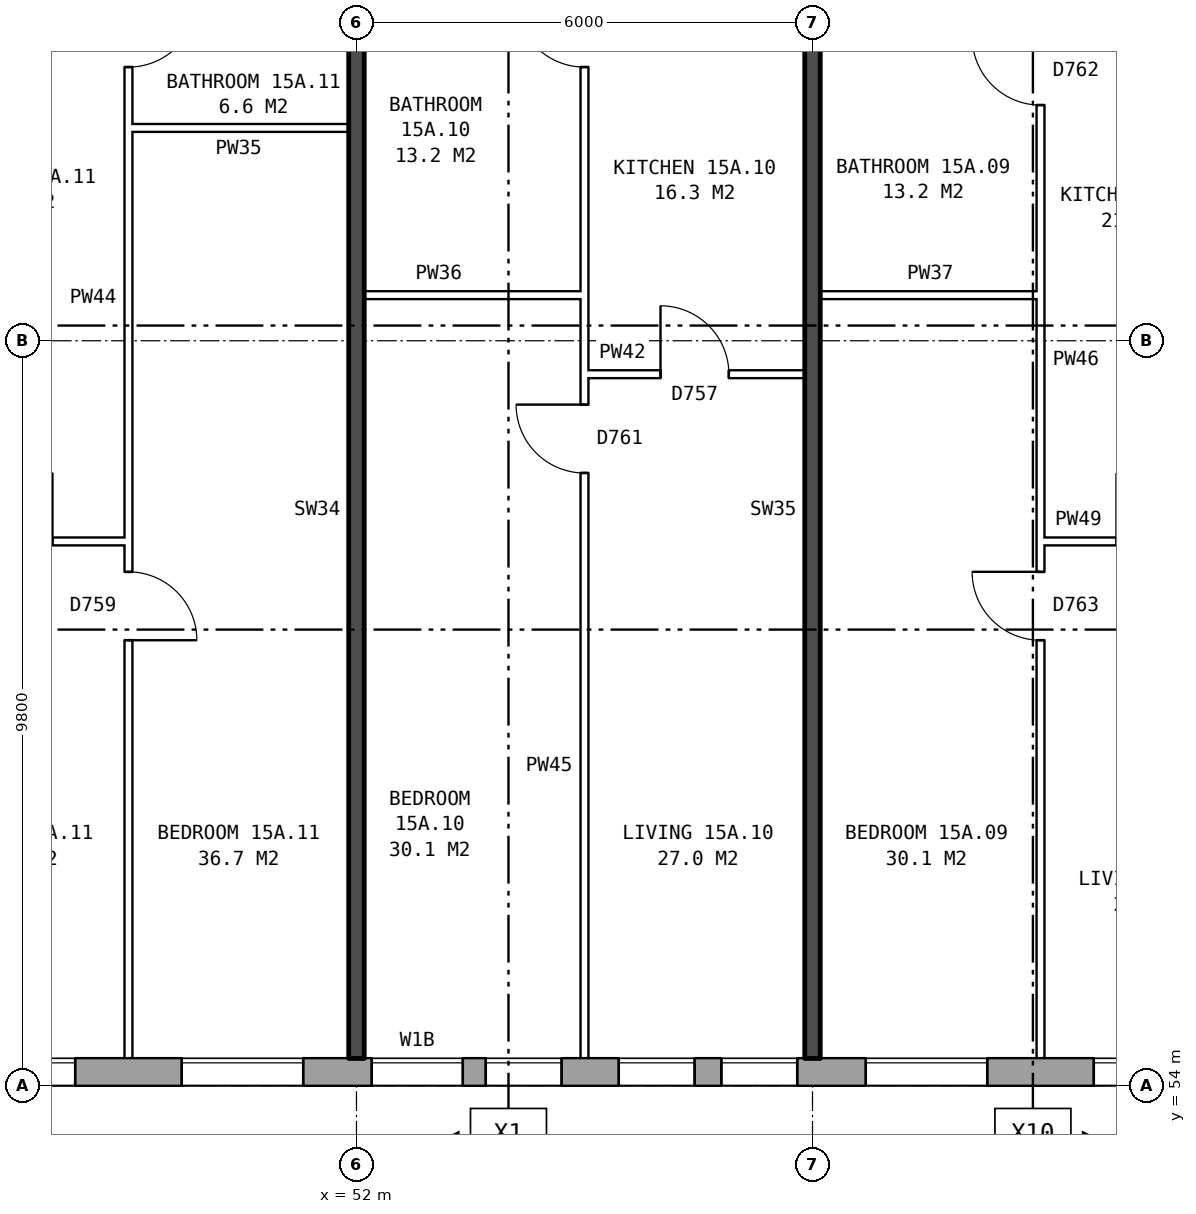
"""IFC4 building model, lengths in metres.
Left out: names, types, materials, properties, quantities, classifications, styles, units other than length and angle.
Written with IfcOpenShell. Run it as: python <this file> out.ifc"""

import sys

from ifc_helpers import new_model, si_unit, direction, frame, frame_2d, origin, place, context, subcontext, project, spatial, rectangle, extrude, element, fill, save


model = new_model("IFC4")
c1 = context("Model", 3, precision=1e-05, world=origin(), true_north=direction((0.0, 1.0)))
c2 = subcontext(c1, "Body", "Model", "MODEL_VIEW")
j1 = project(units=[si_unit("LENGTHUNIT", "METRE"), si_unit("PLANEANGLEUNIT", "RADIAN")], contexts=[c1])
p1 = place(None, origin())
s1 = spatial("IfcSite", under=j1, at=p1, CompositionType="ELEMENT")
p2 = place(p1, origin())
s2 = spatial("IfcBuilding", under=s1, at=p2, CompositionType="ELEMENT")
p3 = place(p2, frame((0.0, 0.0, 56.7)))
s3 = spatial("IfcBuildingStorey", under=s2, at=p3, CompositionType="ELEMENT", Elevation=56.7)
p4 = place(p3, frame((24.575, 54.18, 0.0), z_axis=(0.0, 0.0, 1.0), x_axis=(1.0, 0.0, 0.0)))
e1 = element("IfcWall", 1, at=p4, inside=s3, PredefinedType="STANDARD", context=c2, shape_type="SweptSolid", body=[
    extrude(rectangle(XDim=48.351, YDim=0.36, at=frame_2d((24.175, 0.0))), origin(), (0.0, 0.0, 1.0), 2.85),
])
p5 = place(p4, frame((1.125, 0.0, 0.8)))
e2 = element("IfcOpeningElement", 2, at=p5, cuts=e1, PredefinedType="OPENING", context=c2, shape_type="SweptSolid", body=[
    extrude(rectangle(XDim=1.6, YDim=1.8, at=frame_2d((0.8, 0.9))), frame((0.0, 0.19, 0.0), z_axis=(0.0, -1.0, 0.0), x_axis=(1.0, 0.0, 0.0)), (0.0, 0.0, 1.0), 0.38),
])
p6 = place(p4, frame((4.125, 0.0, 0.8)))
e3 = element("IfcOpeningElement", 3, at=p6, cuts=e1, PredefinedType="OPENING", context=c2, shape_type="SweptSolid", body=[
    extrude(rectangle(XDim=1.6, YDim=1.8, at=frame_2d((0.8, 0.9))), frame((0.0, 0.19, 0.0), z_axis=(0.0, -1.0, 0.0), x_axis=(1.0, 0.0, 0.0)), (0.0, 0.0, 1.0), 0.38),
])
p7 = place(p4, frame((7.125, 0.0, 0.8)))
e4 = element("IfcOpeningElement", 4, at=p7, cuts=e1, PredefinedType="OPENING", context=c2, shape_type="SweptSolid", body=[
    extrude(rectangle(XDim=1.6, YDim=1.8, at=frame_2d((0.8, 0.9))), frame((0.0, 0.19, 0.0), z_axis=(0.0, -1.0, 0.0), x_axis=(1.0, 0.0, 0.0)), (0.0, 0.0, 1.0), 0.38),
])
p8 = place(p4, frame((10.125, 0.0, 0.8)))
e5 = element("IfcOpeningElement", 5, at=p8, cuts=e1, PredefinedType="OPENING", context=c2, shape_type="SweptSolid", body=[
    extrude(rectangle(XDim=1.6, YDim=1.8, at=frame_2d((0.8, 0.9))), frame((0.0, 0.19, 0.0), z_axis=(0.0, -1.0, 0.0), x_axis=(1.0, 0.0, 0.0)), (0.0, 0.0, 1.0), 0.38),
])
p9 = place(p4, frame((13.125, 0.0, 0.8)))
e6 = element("IfcOpeningElement", 6, at=p9, cuts=e1, PredefinedType="OPENING", context=c2, shape_type="SweptSolid", body=[
    extrude(rectangle(XDim=1.6, YDim=1.8, at=frame_2d((0.8, 0.9))), frame((0.0, 0.19, 0.0), z_axis=(0.0, -1.0, 0.0), x_axis=(1.0, 0.0, 0.0)), (0.0, 0.0, 1.0), 0.38),
])
p10 = place(p4, frame((15.625, 0.0, 1.0)))
e7 = element("IfcOpeningElement", 7, at=p10, cuts=e1, PredefinedType="OPENING", context=c2, shape_type="SweptSolid", body=[
    extrude(rectangle(XDim=0.8, YDim=1.5, at=frame_2d((0.4, 0.75))), frame((0.0, 0.19, 0.0), z_axis=(0.0, -1.0, 0.0), x_axis=(1.0, 0.0, 0.0)), (0.0, 0.0, 1.0), 0.38),
])
p11 = place(p4, frame((16.725, 0.0, 1.6)))
e8 = element("IfcOpeningElement", 8, at=p11, cuts=e1, PredefinedType="OPENING", context=c2, shape_type="SweptSolid", body=[
    extrude(rectangle(XDim=0.6, YDim=0.9, at=frame_2d((0.3, 0.45))), frame((0.0, 0.19, 0.0), z_axis=(0.0, -1.0, 0.0), x_axis=(1.0, 0.0, 0.0)), (0.0, 0.0, 1.0), 0.38),
])
p12 = place(p4, frame((22.125, 0.0, 0.8)))
e9 = element("IfcOpeningElement", 9, at=p12, cuts=e1, PredefinedType="OPENING", context=c2, shape_type="SweptSolid", body=[
    extrude(rectangle(XDim=1.6, YDim=1.8, at=frame_2d((0.8, 0.9))), frame((0.0, 0.19, 0.0), z_axis=(0.0, -1.0, 0.0), x_axis=(1.0, 0.0, 0.0)), (0.0, 0.0, 1.0), 0.38),
])
p13 = place(p4, frame((25.125, 0.0, 0.8)))
e10 = element("IfcOpeningElement", 10, at=p13, cuts=e1, PredefinedType="OPENING", context=c2, shape_type="SweptSolid", body=[
    extrude(rectangle(XDim=1.6, YDim=1.8, at=frame_2d((0.8, 0.9))), frame((0.0, 0.19, 0.0), z_axis=(0.0, -1.0, 0.0), x_axis=(1.0, 0.0, 0.0)), (0.0, 0.0, 1.0), 0.38),
])
p14 = place(p4, frame((27.625, 0.0, 0.35)))
e11 = element("IfcOpeningElement", 11, at=p14, cuts=e1, PredefinedType="OPENING", context=c2, shape_type="SweptSolid", body=[
    extrude(rectangle(XDim=1.2, YDim=1.8, at=frame_2d((0.6, 0.9))), frame((0.0, 0.19, 0.0), z_axis=(0.0, -1.0, 0.0), x_axis=(1.0, 0.0, 0.0)), (0.0, 0.0, 1.0), 0.38),
])
p15 = place(p4, frame((30.875, 0.0, 1.7)))
e12 = element("IfcOpeningElement", 12, at=p15, cuts=e1, PredefinedType="OPENING", context=c2, shape_type="SweptSolid", body=[
    extrude(rectangle(XDim=1.0, YDim=0.9, at=frame_2d((0.5, 0.45))), frame((0.0, 0.19, 0.0), z_axis=(0.0, -1.0, 0.0), x_axis=(1.0, 0.0, 0.0)), (0.0, 0.0, 1.0), 0.38),
])
p16 = place(p4, frame((34.125, 0.0, 0.8)))
e13 = element("IfcOpeningElement", 13, at=p16, cuts=e1, PredefinedType="OPENING", context=c2, shape_type="SweptSolid", body=[
    extrude(rectangle(XDim=1.6, YDim=1.8, at=frame_2d((0.8, 0.9))), frame((0.0, 0.19, 0.0), z_axis=(0.0, -1.0, 0.0), x_axis=(1.0, 0.0, 0.0)), (0.0, 0.0, 1.0), 0.38),
])
p17 = place(p4, frame((37.125, 0.0, 0.8)))
e14 = element("IfcOpeningElement", 14, at=p17, cuts=e1, PredefinedType="OPENING", context=c2, shape_type="SweptSolid", body=[
    extrude(rectangle(XDim=1.6, YDim=1.8, at=frame_2d((0.8, 0.9))), frame((0.0, 0.19, 0.0), z_axis=(0.0, -1.0, 0.0), x_axis=(1.0, 0.0, 0.0)), (0.0, 0.0, 1.0), 0.38),
])
p18 = place(p4, frame((40.125, 0.0, 0.8)))
e15 = element("IfcOpeningElement", 15, at=p18, cuts=e1, PredefinedType="OPENING", context=c2, shape_type="SweptSolid", body=[
    extrude(rectangle(XDim=1.6, YDim=1.8, at=frame_2d((0.8, 0.9))), frame((0.0, 0.19, 0.0), z_axis=(0.0, -1.0, 0.0), x_axis=(1.0, 0.0, 0.0)), (0.0, 0.0, 1.0), 0.38),
])
p19 = place(p4, frame((43.125, 0.0, 0.8)))
e16 = element("IfcOpeningElement", 16, at=p19, cuts=e1, PredefinedType="OPENING", context=c2, shape_type="SweptSolid", body=[
    extrude(rectangle(XDim=1.6, YDim=1.8, at=frame_2d((0.8, 0.9))), frame((0.0, 0.19, 0.0), z_axis=(0.0, -1.0, 0.0), x_axis=(1.0, 0.0, 0.0)), (0.0, 0.0, 1.0), 0.38),
])
p20 = place(p4, frame((46.125, 0.0, 0.8)))
e17 = element("IfcOpeningElement", 17, at=p20, cuts=e1, PredefinedType="OPENING", context=c2, shape_type="SweptSolid", body=[
    extrude(rectangle(XDim=1.6, YDim=1.8, at=frame_2d((0.8, 0.9))), frame((0.0, 0.19, 0.0), z_axis=(0.0, -1.0, 0.0), x_axis=(1.0, 0.0, 0.0)), (0.0, 0.0, 1.0), 0.38),
])
p21 = place(p4, frame((18.875, 0.0, 0.8)))
e18 = element("IfcOpeningElement", 18, at=p21, cuts=e1, PredefinedType="OPENING", context=c2, shape_type="SweptSolid", body=[
    extrude(rectangle(XDim=1.0, YDim=0.9, at=frame_2d((0.5, 0.45))), frame((0.0, 0.19, 0.0), z_axis=(0.0, -1.0, 0.0), x_axis=(1.0, 0.0, 0.0)), (0.0, 0.0, 1.0), 0.38),
])
p22 = place(p4, frame((20.175, 0.0, 0.8)))
e19 = element("IfcOpeningElement", 19, at=p22, cuts=e1, PredefinedType="OPENING", context=c2, shape_type="SweptSolid", body=[
    extrude(rectangle(XDim=1.0, YDim=1.8, at=frame_2d((0.5, 0.9))), frame((0.0, 0.19, 0.0), z_axis=(0.0, -1.0, 0.0), x_axis=(1.0, 0.0, 0.0)), (0.0, 0.0, 1.0), 0.38),
])
p23 = place(p4, frame((29.125, 0.0, 0.35)))
e20 = element("IfcOpeningElement", 20, at=p23, cuts=e1, PredefinedType="OPENING", context=c2, shape_type="SweptSolid", body=[
    extrude(rectangle(XDim=1.0, YDim=0.9, at=frame_2d((0.5, 0.45))), frame((0.0, 0.19, 0.0), z_axis=(0.0, -1.0, 0.0), x_axis=(1.0, 0.0, 0.0)), (0.0, 0.0, 1.0), 0.38),
])
p24 = place(p4, frame((32.225, 0.0, 0.8)))
e21 = element("IfcOpeningElement", 21, at=p24, cuts=e1, PredefinedType="OPENING", context=c2, shape_type="SweptSolid", body=[
    extrude(rectangle(XDim=1.0, YDim=1.8, at=frame_2d((0.5, 0.9))), frame((0.0, 0.19, 0.0), z_axis=(0.0, -1.0, 0.0), x_axis=(1.0, 0.0, 0.0)), (0.0, 0.0, 1.0), 0.38),
])
p25 = place(p3, frame((46.1, 61.16, 0.0), z_axis=(0.0, 0.0, 1.0), x_axis=(1.0, 0.0, 0.0)))
e22 = element("IfcWall", 22, at=p25, inside=s3, PredefinedType="PARTITIONING", context=c2, shape_type="SweptSolid", body=[
    extrude(rectangle(XDim=2.9, YDim=0.1, at=frame_2d((1.45, 0.0))), origin(), (0.0, 0.0, 1.0), 2.85),
])
p26 = place(p25, frame((1.0, 0.0, 0.0)))
e23 = element("IfcOpeningElement", 23, at=p26, cuts=e22, PredefinedType="OPENING", context=c2, shape_type="SweptSolid", body=[
    extrude(rectangle(XDim=0.9, YDim=2.1, at=frame_2d((0.45, 1.05))), frame((0.0, 0.06, 0.0), z_axis=(0.0, -1.0, 0.0), x_axis=(1.0, 0.0, 0.0)), (0.0, 0.0, 1.0), 0.12),
])
p27 = place(p3, frame((61.0, 61.16, 0.0), z_axis=(0.0, 0.0, 1.0), x_axis=(1.0, 0.0, 0.0)))
e24 = element("IfcWall", 24, at=p27, inside=s3, PredefinedType="PARTITIONING", context=c2, shape_type="SweptSolid", body=[
    extrude(rectangle(XDim=2.9, YDim=0.1, at=frame_2d((1.45, 0.0))), origin(), (0.0, 0.0, 1.0), 2.85),
])
p28 = place(p27, frame((1.0, 0.0, 0.0)))
e25 = element("IfcOpeningElement", 25, at=p28, cuts=e24, PredefinedType="OPENING", context=c2, shape_type="SweptSolid", body=[
    extrude(rectangle(XDim=0.9, YDim=2.1, at=frame_2d((0.45, 1.05))), frame((0.0, 0.06, 0.0), z_axis=(0.0, -1.0, 0.0), x_axis=(1.0, 0.0, 0.0)), (0.0, 0.0, 1.0), 0.12),
])
p29 = place(p3, frame((55.0, 63.36, 0.0), z_axis=(0.0, 0.0, 1.0), x_axis=(1.0, 0.0, 0.0)))
e26 = element("IfcWall", 26, at=p29, inside=s3, PredefinedType="PARTITIONING", context=c2, shape_type="SweptSolid", body=[
    extrude(rectangle(XDim=2.9, YDim=0.1, at=frame_2d((1.45, 0.0))), origin(), (0.0, 0.0, 1.0), 2.85),
])
p30 = place(p29, frame((1.0, 0.0, 0.0)))
e27 = element("IfcOpeningElement", 27, at=p30, cuts=e26, PredefinedType="OPENING", context=c2, shape_type="SweptSolid", body=[
    extrude(rectangle(XDim=0.9, YDim=2.1, at=frame_2d((0.45, 1.05))), frame((0.0, 0.06, 0.0), z_axis=(0.0, -1.0, 0.0), x_axis=(1.0, 0.0, 0.0)), (0.0, 0.0, 1.0), 0.12),
])
for number, where, z_axis, x_axis in (
    (28, (52.1, 64.4, 0.0), (0.0, 0.0, 1.0), (1.0, 0.0, 0.0)),
    (29, (58.1, 64.4, 0.0), (0.0, 0.0, 1.0), (1.0, 0.0, 0.0)),
    (30, (49.0, 66.6, 0.0), (0.0, 0.0, 1.0), (1.0, 0.0, 0.0)),
):
    element("IfcWall", number, at=place(p3, frame(where, z_axis=z_axis, x_axis=x_axis)), inside=s3, PredefinedType="PARTITIONING", context=c2, shape_type="SweptSolid", body=[
        extrude(rectangle(XDim=2.9, YDim=0.1, at=frame_2d((1.45, 0.0))), origin(), (0.0, 0.0, 1.0), 2.85),
    ])
p31 = place(p3, frame((49.0, 54.36, 0.0), z_axis=(0.0, 0.0, 1.0), x_axis=(0.0, 1.0, 0.0)))
e31 = element("IfcWall", 31, at=p31, inside=s3, PredefinedType="PARTITIONING", context=c2, shape_type="SweptSolid", body=[
    extrude(rectangle(XDim=14.34, YDim=0.1, at=frame_2d((7.17, 0.0))), origin(), (0.0, 0.0, 1.0), 2.85),
])
p32 = place(p31, frame((5.5, 0.0, 0.0)))
e32 = element("IfcOpeningElement", 32, at=p32, cuts=e31, PredefinedType="OPENING", context=c2, shape_type="SweptSolid", body=[
    extrude(rectangle(XDim=0.9, YDim=2.1, at=frame_2d((0.45, 1.05))), frame((0.0, 0.06, 0.0), z_axis=(0.0, -1.0, 0.0), x_axis=(1.0, 0.0, 0.0)), (0.0, 0.0, 1.0), 0.12),
])
p33 = place(p31, frame((13.04, 0.0, 0.0)))
e33 = element("IfcOpeningElement", 33, at=p33, cuts=e31, PredefinedType="OPENING", context=c2, shape_type="SweptSolid", body=[
    extrude(rectangle(XDim=0.9, YDim=2.1, at=frame_2d((0.45, 1.05))), frame((0.0, 0.06, 0.0), z_axis=(0.0, -1.0, 0.0), x_axis=(1.0, 0.0, 0.0)), (0.0, 0.0, 1.0), 0.12),
])
p34 = place(p3, frame((52.0, 54.36, 0.0), z_axis=(0.0, 0.0, 1.0), x_axis=(0.0, 1.0, 0.0)))
e34 = element("IfcWall", 34, at=p34, inside=s3, PredefinedType="SOLIDWALL", context=c2, shape_type="SweptSolid", body=[
    extrude(rectangle(XDim=14.44, YDim=0.2, at=frame_2d((7.22, 0.0))), origin(), (0.0, 0.0, 1.0), 2.85),
])
p35 = place(p3, frame((55.0, 54.36, 0.0), z_axis=(0.0, 0.0, 1.0), x_axis=(0.0, 1.0, 0.0)))
e35 = element("IfcWall", 35, at=p35, inside=s3, PredefinedType="PARTITIONING", context=c2, shape_type="SweptSolid", body=[
    extrude(rectangle(XDim=14.34, YDim=0.1, at=frame_2d((7.17, 0.0))), origin(), (0.0, 0.0, 1.0), 2.85),
])
p36 = place(p35, frame((7.7, 0.0, 0.0)))
e36 = element("IfcOpeningElement", 36, at=p36, cuts=e35, PredefinedType="OPENING", context=c2, shape_type="SweptSolid", body=[
    extrude(rectangle(XDim=0.9, YDim=2.1, at=frame_2d((0.45, 1.05))), frame((0.0, 0.06, 0.0), z_axis=(0.0, -1.0, 0.0), x_axis=(1.0, 0.0, 0.0)), (0.0, 0.0, 1.0), 0.12),
])
p37 = place(p35, frame((13.04, 0.0, 0.0)))
e37 = element("IfcOpeningElement", 37, at=p37, cuts=e35, PredefinedType="OPENING", context=c2, shape_type="SweptSolid", body=[
    extrude(rectangle(XDim=0.9, YDim=2.1, at=frame_2d((0.45, 1.05))), frame((0.0, 0.06, 0.0), z_axis=(0.0, -1.0, 0.0), x_axis=(1.0, 0.0, 0.0)), (0.0, 0.0, 1.0), 0.12),
])
p38 = place(p3, frame((58.0, 54.36, 0.0), z_axis=(0.0, 0.0, 1.0), x_axis=(0.0, 1.0, 0.0)))
e38 = element("IfcWall", 38, at=p38, inside=s3, PredefinedType="SOLIDWALL", context=c2, shape_type="SweptSolid", body=[
    extrude(rectangle(XDim=14.44, YDim=0.2, at=frame_2d((7.22, 0.0))), origin(), (0.0, 0.0, 1.0), 2.85),
])
p39 = place(p3, frame((61.0, 54.36, 0.0), z_axis=(0.0, 0.0, 1.0), x_axis=(0.0, 1.0, 0.0)))
e39 = element("IfcWall", 39, at=p39, inside=s3, PredefinedType="PARTITIONING", context=c2, shape_type="SweptSolid", body=[
    extrude(rectangle(XDim=14.34, YDim=0.1, at=frame_2d((7.17, 0.0))), origin(), (0.0, 0.0, 1.0), 2.85),
])
p40 = place(p39, frame((5.5, 0.0, 0.0)))
e40 = element("IfcOpeningElement", 40, at=p40, cuts=e39, PredefinedType="OPENING", context=c2, shape_type="SweptSolid", body=[
    extrude(rectangle(XDim=0.9, YDim=2.1, at=frame_2d((0.45, 1.05))), frame((0.0, 0.06, 0.0), z_axis=(0.0, -1.0, 0.0), x_axis=(1.0, 0.0, 0.0)), (0.0, 0.0, 1.0), 0.12),
])
p41 = place(p39, frame((12.54, 0.0, 0.0)))
e41 = element("IfcOpeningElement", 41, at=p41, cuts=e39, PredefinedType="OPENING", context=c2, shape_type="SweptSolid", body=[
    extrude(rectangle(XDim=0.9, YDim=2.1, at=frame_2d((0.45, 1.05))), frame((0.0, 0.06, 0.0), z_axis=(0.0, -1.0, 0.0), x_axis=(1.0, 0.0, 0.0)), (0.0, 0.0, 1.0), 0.12),
])
p42 = place(p12, origin())
e42 = element("IfcWindow", 42, at=p42, inside=s3, PartitioningType="SINGLE_PANEL", PredefinedType="WINDOW", context=c2, shape_type="SweptSolid", body=[
    extrude(rectangle(XDim=1.6, YDim=1.8, at=frame_2d((0.8, 0.9))), frame((0.0, 0.15, 0.0), z_axis=(0.0, -1.0, 0.0), x_axis=(1.0, 0.0, 0.0)), (0.0, 0.0, 1.0), 0.06),
])
fill(e9, e42)
p43 = place(p13, origin())
e43 = element("IfcWindow", 43, at=p43, inside=s3, PartitioningType="SINGLE_PANEL", PredefinedType="WINDOW", context=c2, shape_type="SweptSolid", body=[
    extrude(rectangle(XDim=1.6, YDim=1.8, at=frame_2d((0.8, 0.9))), frame((0.0, 0.15, 0.0), z_axis=(0.0, -1.0, 0.0), x_axis=(1.0, 0.0, 0.0)), (0.0, 0.0, 1.0), 0.06),
])
fill(e10, e43)
p44 = place(p14, origin())
e44 = element("IfcWindow", 44, at=p44, inside=s3, PartitioningType="SINGLE_PANEL", PredefinedType="WINDOW", context=c2, shape_type="SweptSolid", body=[
    extrude(rectangle(XDim=1.2, YDim=1.8, at=frame_2d((0.6, 0.9))), frame((0.0, 0.15, 0.0), z_axis=(0.0, -1.0, 0.0), x_axis=(1.0, 0.0, 0.0)), (0.0, 0.0, 1.0), 0.06),
])
fill(e11, e44)
p45 = place(p15, origin())
e45 = element("IfcWindow", 45, at=p45, inside=s3, PartitioningType="SINGLE_PANEL", PredefinedType="WINDOW", context=c2, shape_type="SweptSolid", body=[
    extrude(rectangle(XDim=1.0, YDim=0.9, at=frame_2d((0.5, 0.45))), frame((0.0, 0.15, 0.0), z_axis=(0.0, -1.0, 0.0), x_axis=(1.0, 0.0, 0.0)), (0.0, 0.0, 1.0), 0.06),
])
fill(e12, e45)
p46 = place(p16, origin())
e46 = element("IfcWindow", 46, at=p46, inside=s3, PartitioningType="SINGLE_PANEL", PredefinedType="WINDOW", context=c2, shape_type="SweptSolid", body=[
    extrude(rectangle(XDim=1.6, YDim=1.8, at=frame_2d((0.8, 0.9))), frame((0.0, 0.15, 0.0), z_axis=(0.0, -1.0, 0.0), x_axis=(1.0, 0.0, 0.0)), (0.0, 0.0, 1.0), 0.06),
])
fill(e13, e46)
p47 = place(p17, origin())
e47 = element("IfcWindow", 47, at=p47, inside=s3, PartitioningType="SINGLE_PANEL", PredefinedType="WINDOW", context=c2, shape_type="SweptSolid", body=[
    extrude(rectangle(XDim=1.6, YDim=1.8, at=frame_2d((0.8, 0.9))), frame((0.0, 0.15, 0.0), z_axis=(0.0, -1.0, 0.0), x_axis=(1.0, 0.0, 0.0)), (0.0, 0.0, 1.0), 0.06),
])
fill(e14, e47)
p48 = place(p40, origin())
e48 = element("IfcDoor", 48, at=p48, inside=s3, OperationType="SINGLE_SWING_RIGHT", PredefinedType="DOOR", context=c2, shape_type="SweptSolid", body=[
    extrude(rectangle(XDim=0.9, YDim=2.1, at=frame_2d((0.45, 1.05))), frame((0.0, 0.025, 0.0), z_axis=(0.0, -1.0, 0.0), x_axis=(1.0, 0.0, 0.0)), (0.0, 0.0, 1.0), 0.05),
])
fill(e40, e48)
p49 = place(p41, origin())
e49 = element("IfcDoor", 49, at=p49, inside=s3, OperationType="SINGLE_SWING_RIGHT", PredefinedType="DOOR", context=c2, shape_type="SweptSolid", body=[
    extrude(rectangle(XDim=0.9, YDim=2.1, at=frame_2d((0.45, 1.05))), frame((0.0, 0.025, 0.0), z_axis=(0.0, -1.0, 0.0), x_axis=(1.0, 0.0, 0.0)), (0.0, 0.0, 1.0), 0.05),
])
fill(e41, e49)
p50 = place(p36, origin())
e50 = element("IfcDoor", 50, at=p50, inside=s3, OperationType="SINGLE_SWING_RIGHT", PredefinedType="DOOR", context=c2, shape_type="SweptSolid", body=[
    extrude(rectangle(XDim=0.9, YDim=2.1, at=frame_2d((0.45, 1.05))), frame((0.0, 0.025, 0.0), z_axis=(0.0, -1.0, 0.0), x_axis=(1.0, 0.0, 0.0)), (0.0, 0.0, 1.0), 0.05),
])
fill(e36, e50)
p51 = place(p30, origin())
e51 = element("IfcDoor", 51, at=p51, inside=s3, OperationType="SINGLE_SWING_LEFT", PredefinedType="DOOR", context=c2, shape_type="SweptSolid", body=[
    extrude(rectangle(XDim=0.9, YDim=2.1, at=frame_2d((0.45, 1.05))), frame((0.0, 0.025, 0.0), z_axis=(0.0, -1.0, 0.0), x_axis=(1.0, 0.0, 0.0)), (0.0, 0.0, 1.0), 0.05),
])
fill(e27, e51)
p52 = place(p37, origin())
e52 = element("IfcDoor", 52, at=p52, inside=s3, OperationType="SINGLE_SWING_RIGHT", PredefinedType="DOOR", context=c2, shape_type="SweptSolid", body=[
    extrude(rectangle(XDim=0.9, YDim=2.1, at=frame_2d((0.45, 1.05))), frame((0.0, 0.025, 0.0), z_axis=(0.0, -1.0, 0.0), x_axis=(1.0, 0.0, 0.0)), (0.0, 0.0, 1.0), 0.05),
])
fill(e37, e52)
p53 = place(p32, frame((0.9, 0.0, 0.0), z_axis=(0.0, 0.0, 1.0), x_axis=(-1.0, 0.0, 0.0)))
e53 = element("IfcDoor", 53, at=p53, inside=s3, OperationType="SINGLE_SWING_RIGHT", PredefinedType="DOOR", context=c2, shape_type="SweptSolid", body=[
    extrude(rectangle(XDim=0.9, YDim=2.1, at=frame_2d((0.45, 1.05))), frame((0.0, 0.025, 0.0), z_axis=(0.0, -1.0, 0.0), x_axis=(1.0, 0.0, 0.0)), (0.0, 0.0, 1.0), 0.05),
])
fill(e32, e53)
p54 = place(p33, frame((0.9, 0.0, 0.0), z_axis=(0.0, 0.0, 1.0), x_axis=(-1.0, 0.0, 0.0)))
e54 = element("IfcDoor", 54, at=p54, inside=s3, OperationType="SINGLE_SWING_LEFT", PredefinedType="DOOR", context=c2, shape_type="SweptSolid", body=[
    extrude(rectangle(XDim=0.9, YDim=2.1, at=frame_2d((0.45, 1.05))), frame((0.0, 0.025, 0.0), z_axis=(0.0, -1.0, 0.0), x_axis=(1.0, 0.0, 0.0)), (0.0, 0.0, 1.0), 0.05),
])
fill(e33, e54)
p55 = place(p23, origin())
e55 = element("IfcWindow", 55, at=p55, inside=s3, PartitioningType="SINGLE_PANEL", PredefinedType="WINDOW", context=c2, shape_type="SweptSolid", body=[
    extrude(rectangle(XDim=1.0, YDim=0.9, at=frame_2d((0.5, 0.45))), frame((0.0, 0.15, 0.0), z_axis=(0.0, -1.0, 0.0), x_axis=(1.0, 0.0, 0.0)), (0.0, 0.0, 1.0), 0.06),
])
fill(e20, e55)
p56 = place(p24, origin())
e56 = element("IfcWindow", 56, at=p56, inside=s3, PartitioningType="SINGLE_PANEL", PredefinedType="WINDOW", context=c2, shape_type="SweptSolid", body=[
    extrude(rectangle(XDim=1.0, YDim=1.8, at=frame_2d((0.5, 0.9))), frame((0.0, 0.15, 0.0), z_axis=(0.0, -1.0, 0.0), x_axis=(1.0, 0.0, 0.0)), (0.0, 0.0, 1.0), 0.06),
])
fill(e21, e56)
save(model, sys.argv[1])
